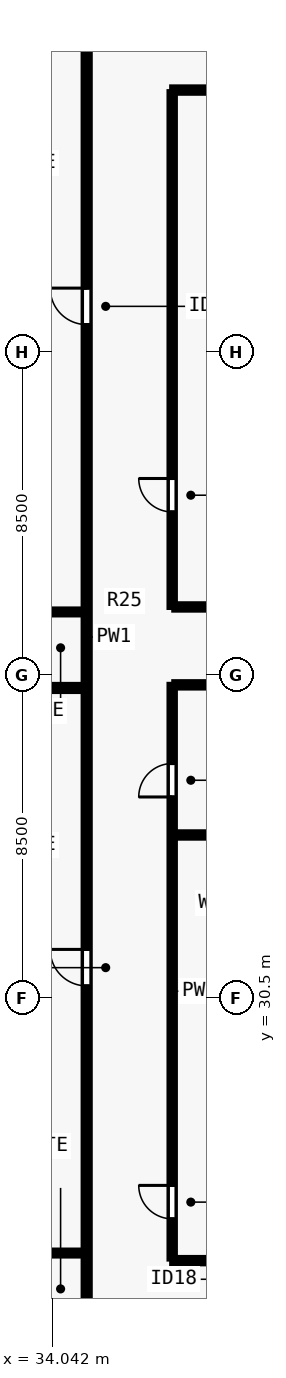
"""IFC4 building model, lengths in metres.
Left out: names, types, materials, properties, quantities, classifications, styles, units other than length and angle.
Written with IfcOpenShell. Run it as: python <this file> out.ifc"""

import sys

from ifc_helpers import new_model, si_unit, direction, frame, frame_2d, origin, place, context, subcontext, project, spatial, rectangle, extrude, element, fill, save


model = new_model("IFC4")
c1 = context("Model", 3, precision=1e-05, world=origin(), true_north=direction((0.0, 1.0)))
c2 = subcontext(c1, "Body", "Model", "MODEL_VIEW")
j1 = project(units=[si_unit("LENGTHUNIT", "METRE"), si_unit("PLANEANGLEUNIT", "RADIAN")], contexts=[c1])
p1 = place(None, origin())
s1 = spatial("IfcSite", under=j1, at=p1, CompositionType="ELEMENT")
p2 = place(p1, origin())
s2 = spatial("IfcBuilding", under=s1, at=p2, CompositionType="ELEMENT")
p3 = place(p2, frame((0.0, 0.0, 69.0)))
s3 = spatial("IfcBuildingStorey", under=s2, at=p3, CompositionType="ELEMENT", Elevation=69.0)
p4 = place(p3, frame((34.95, 21.415, 0.0), z_axis=(0.0, 0.0, 1.0), x_axis=(0.0, 1.0, 0.0)))
e1 = element("IfcWall", 1, at=p4, inside=s3, PredefinedType="PARTITIONING", context=c2, shape_type="SweptSolid", body=[
    extrude(rectangle(XDim=35.17, YDim=0.16, at=frame_2d((17.585, 0.0))), origin(), (0.0, 0.0, 1.0), 3.28),
])
p5 = place(p4, frame((9.414, 0.0, 0.0)))
e2 = element("IfcOpeningElement", 2, at=p5, cuts=e1, PredefinedType="OPENING", context=c2, shape_type="SweptSolid", body=[
    extrude(rectangle(XDim=0.96, YDim=2.15, at=frame_2d((0.48, 1.075))), frame((0.0, 0.09, 0.0), z_axis=(0.0, -1.0, 0.0), x_axis=(1.0, 0.0, 0.0)), (0.0, 0.0, 1.0), 0.18),
])
p6 = place(p4, frame((26.814, 0.0, 0.0)))
e3 = element("IfcOpeningElement", 3, at=p6, cuts=e1, PredefinedType="OPENING", context=c2, shape_type="SweptSolid", body=[
    extrude(rectangle(XDim=0.96, YDim=2.15, at=frame_2d((0.48, 1.075))), frame((0.0, 0.09, 0.0), z_axis=(0.0, -1.0, 0.0), x_axis=(1.0, 0.0, 0.0)), (0.0, 0.0, 1.0), 0.18),
])
p7 = place(p3, frame((37.2, 23.6, 0.0), z_axis=(0.0, 0.0, 1.0), x_axis=(1.0, 0.0, 0.0)))
e4 = element("IfcWall", 4, at=p7, inside=s3, PredefinedType="PARTITIONING", context=c2, shape_type="SweptSolid", body=[
    extrude(rectangle(XDim=29.6, YDim=0.14, at=frame_2d((14.8, 0.0))), origin(), (0.0, 0.0, 1.0), 3.28),
])
p8 = place(p7, frame((1.2, 0.0, 0.0)))
e5 = element("IfcOpeningElement", 5, at=p8, cuts=e4, PredefinedType="OPENING", context=c2, shape_type="SweptSolid", body=[
    extrude(rectangle(XDim=0.88, YDim=2.1, at=frame_2d((0.44, 1.05))), frame((0.0, 0.08, 0.0), z_axis=(0.0, -1.0, 0.0), x_axis=(1.0, 0.0, 0.0)), (0.0, 0.0, 1.0), 0.16),
])
p9 = place(p7, frame((11.3, 0.0, 0.0)))
e6 = element("IfcOpeningElement", 6, at=p9, cuts=e4, PredefinedType="OPENING", context=c2, shape_type="SweptSolid", body=[
    extrude(rectangle(XDim=0.88, YDim=2.1, at=frame_2d((0.44, 1.05))), frame((0.0, 0.08, 0.0), z_axis=(0.0, -1.0, 0.0), x_axis=(1.0, 0.0, 0.0)), (0.0, 0.0, 1.0), 0.16),
])
p10 = place(p7, frame((21.8, 0.0, 0.0)))
e7 = element("IfcOpeningElement", 7, at=p10, cuts=e4, PredefinedType="OPENING", context=c2, shape_type="SweptSolid", body=[
    extrude(rectangle(XDim=0.88, YDim=2.1, at=frame_2d((0.44, 1.05))), frame((0.0, 0.08, 0.0), z_axis=(0.0, -1.0, 0.0), x_axis=(1.0, 0.0, 0.0)), (0.0, 0.0, 1.0), 0.16),
])
p11 = place(p3, frame((37.2, 54.4, 0.0), z_axis=(0.0, 0.0, 1.0), x_axis=(1.0, 0.0, 0.0)))
e8 = element("IfcWall", 8, at=p11, inside=s3, PredefinedType="PARTITIONING", context=c2, shape_type="SweptSolid", body=[
    extrude(rectangle(XDim=29.6, YDim=0.14, at=frame_2d((14.8, 0.0))), origin(), (0.0, 0.0, 1.0), 3.28),
])
p12 = place(p11, frame((2.2, 0.0, 0.0)))
e9 = element("IfcOpeningElement", 9, at=p12, cuts=e8, PredefinedType="OPENING", context=c2, shape_type="SweptSolid", body=[
    extrude(rectangle(XDim=0.88, YDim=2.1, at=frame_2d((0.44, 1.05))), frame((0.0, 0.08, 0.0), z_axis=(0.0, -1.0, 0.0), x_axis=(1.0, 0.0, 0.0)), (0.0, 0.0, 1.0), 0.16),
])
p13 = place(p11, frame((15.3, 0.0, 0.0)))
e10 = element("IfcOpeningElement", 10, at=p13, cuts=e8, PredefinedType="OPENING", context=c2, shape_type="SweptSolid", body=[
    extrude(rectangle(XDim=0.88, YDim=2.1, at=frame_2d((0.44, 1.05))), frame((0.0, 0.08, 0.0), z_axis=(0.0, -1.0, 0.0), x_axis=(1.0, 0.0, 0.0)), (0.0, 0.0, 1.0), 0.16),
])
p14 = place(p11, frame((24.8, 0.0, 0.0)))
e11 = element("IfcOpeningElement", 11, at=p14, cuts=e8, PredefinedType="OPENING", context=c2, shape_type="SweptSolid", body=[
    extrude(rectangle(XDim=0.88, YDim=2.1, at=frame_2d((0.44, 1.05))), frame((0.0, 0.08, 0.0), z_axis=(0.0, -1.0, 0.0), x_axis=(1.0, 0.0, 0.0)), (0.0, 0.0, 1.0), 0.16),
])
p15 = place(p3, frame((37.2, 23.655, 0.0), z_axis=(0.0, 0.0, 1.0), x_axis=(0.0, 1.0, 0.0)))
e12 = element("IfcWall", 12, at=p15, inside=s3, PredefinedType="PARTITIONING", context=c2, shape_type="SweptSolid", body=[
    extrude(rectangle(XDim=15.095, YDim=0.14, at=frame_2d((7.547, 0.0))), origin(), (0.0, 0.0, 1.0), 3.28),
])
p16 = place(p15, frame((1.045, 0.0, 0.0)))
e13 = element("IfcOpeningElement", 13, at=p16, cuts=e12, PredefinedType="OPENING", context=c2, shape_type="SweptSolid", body=[
    extrude(rectangle(XDim=0.88, YDim=2.1, at=frame_2d((0.44, 1.05))), frame((0.0, 0.08, 0.0), z_axis=(0.0, -1.0, 0.0), x_axis=(1.0, 0.0, 0.0)), (0.0, 0.0, 1.0), 0.16),
])
p17 = place(p15, frame((12.145, 0.0, 0.0)))
e14 = element("IfcOpeningElement", 14, at=p17, cuts=e12, PredefinedType="OPENING", context=c2, shape_type="SweptSolid", body=[
    extrude(rectangle(XDim=0.88, YDim=2.1, at=frame_2d((0.44, 1.05))), frame((0.0, 0.08, 0.0), z_axis=(0.0, -1.0, 0.0), x_axis=(1.0, 0.0, 0.0)), (0.0, 0.0, 1.0), 0.16),
])
p18 = place(p3, frame((37.2, 40.8, 0.0), z_axis=(0.0, 0.0, 1.0), x_axis=(0.0, 1.0, 0.0)))
e15 = element("IfcWall", 15, at=p18, inside=s3, PredefinedType="PARTITIONING", context=c2, shape_type="SweptSolid", body=[
    extrude(rectangle(XDim=13.545, YDim=0.14, at=frame_2d((6.772, 0.0))), origin(), (0.0, 0.0, 1.0), 3.28),
])
p19 = place(p18, frame((2.5, 0.0, 0.0)))
e16 = element("IfcOpeningElement", 16, at=p19, cuts=e15, PredefinedType="OPENING", context=c2, shape_type="SweptSolid", body=[
    extrude(rectangle(XDim=0.88, YDim=2.1, at=frame_2d((0.44, 1.05))), frame((0.0, 0.08, 0.0), z_axis=(0.0, -1.0, 0.0), x_axis=(1.0, 0.0, 0.0)), (0.0, 0.0, 1.0), 0.16),
])
for number, where, z_axis, x_axis in (
    (17, (37.255, 38.75, 0.0), (0.0, 0.0, 1.0), (1.0, 0.0, 0.0)),
    (18, (37.255, 40.8, 0.0), (0.0, 0.0, 1.0), (1.0, 0.0, 0.0)),
    (19, (37.255, 34.8, 0.0), (0.0, 0.0, 1.0), (1.0, 0.0, 0.0)),
):
    element("IfcWall", number, at=place(p3, frame(where, z_axis=z_axis, x_axis=x_axis)), inside=s3, PredefinedType="PARTITIONING", context=c2, shape_type="SweptSolid", body=[
        extrude(rectangle(XDim=5.985, YDim=0.14, at=frame_2d((2.993, 0.0))), origin(), (0.0, 0.0, 1.0), 3.28),
    ])
p20 = place(p3, frame((32.65, 23.8, 0.0), z_axis=(0.0, 0.0, 1.0), x_axis=(1.0, 0.0, 0.0)))
e20 = element("IfcWall", 20, at=p20, inside=s3, PredefinedType="PLUMBINGWALL", context=c2, shape_type="SweptSolid", body=[
    extrude(rectangle(XDim=2.235, YDim=0.13, at=frame_2d((1.118, 0.0))), origin(), (0.0, 0.0, 1.0), 3.28),
])
p21 = place(p3, frame((26.845, 38.668, 0.0), z_axis=(0.0, 0.0, 1.0), x_axis=(1.0, 0.0, 0.0)))
e21 = element("IfcWall", 21, at=p21, inside=s3, PredefinedType="PARTITIONING", context=c2, shape_type="SweptSolid", body=[
    extrude(rectangle(XDim=8.04, YDim=0.16, at=frame_2d((4.02, 0.0))), origin(), (0.0, 0.0, 1.0), 2.849),
])
p22 = place(p3, frame((32.65, 40.668, 0.0), z_axis=(0.0, 0.0, 1.0), x_axis=(1.0, 0.0, 0.0)))
e22 = element("IfcWall", 22, at=p22, inside=s3, PredefinedType="PLUMBINGWALL", context=c2, shape_type="SweptSolid", body=[
    extrude(rectangle(XDim=2.235, YDim=0.13, at=frame_2d((1.118, 0.0))), origin(), (0.0, 0.0, 1.0), 3.28),
])
p23 = place(p16, origin())
e23 = element("IfcDoor", 23, at=p23, inside=s3, OperationType="SINGLE_SWING_RIGHT", PredefinedType="DOOR", context=c2, shape_type="SweptSolid", body=[
    extrude(rectangle(XDim=0.88, YDim=2.1, at=frame_2d((0.44, 1.05))), frame((0.0, 0.025, 0.0), z_axis=(0.0, -1.0, 0.0), x_axis=(1.0, 0.0, 0.0)), (0.0, 0.0, 1.0), 0.05),
])
fill(e13, e23)
p24 = place(p17, origin())
e24 = element("IfcDoor", 24, at=p24, inside=s3, OperationType="SINGLE_SWING_LEFT", PredefinedType="DOOR", context=c2, shape_type="SweptSolid", body=[
    extrude(rectangle(XDim=0.88, YDim=2.1, at=frame_2d((0.44, 1.05))), frame((0.0, 0.025, 0.0), z_axis=(0.0, -1.0, 0.0), x_axis=(1.0, 0.0, 0.0)), (0.0, 0.0, 1.0), 0.05),
])
fill(e14, e24)
p25 = place(p19, origin())
e25 = element("IfcDoor", 25, at=p25, inside=s3, OperationType="SINGLE_SWING_RIGHT", PredefinedType="DOOR", context=c2, shape_type="SweptSolid", body=[
    extrude(rectangle(XDim=0.88, YDim=2.1, at=frame_2d((0.44, 1.05))), frame((0.0, 0.025, 0.0), z_axis=(0.0, -1.0, 0.0), x_axis=(1.0, 0.0, 0.0)), (0.0, 0.0, 1.0), 0.05),
])
fill(e16, e25)
p26 = place(p5, origin())
e26 = element("IfcDoor", 26, at=p26, inside=s3, OperationType="SINGLE_SWING_RIGHT", PredefinedType="DOOR", context=c2, shape_type="SweptSolid", body=[
    extrude(rectangle(XDim=0.96, YDim=2.15, at=frame_2d((0.48, 1.075))), frame((0.0, 0.025, 0.0), z_axis=(0.0, -1.0, 0.0), x_axis=(1.0, 0.0, 0.0)), (0.0, 0.0, 1.0), 0.05),
])
fill(e2, e26)
p27 = place(p6, origin())
e27 = element("IfcDoor", 27, at=p27, inside=s3, OperationType="SINGLE_SWING_RIGHT", PredefinedType="DOOR", context=c2, shape_type="SweptSolid", body=[
    extrude(rectangle(XDim=0.96, YDim=2.15, at=frame_2d((0.48, 1.075))), frame((0.0, 0.025, 0.0), z_axis=(0.0, -1.0, 0.0), x_axis=(1.0, 0.0, 0.0)), (0.0, 0.0, 1.0), 0.05),
])
fill(e3, e27)
save(model, sys.argv[1])
